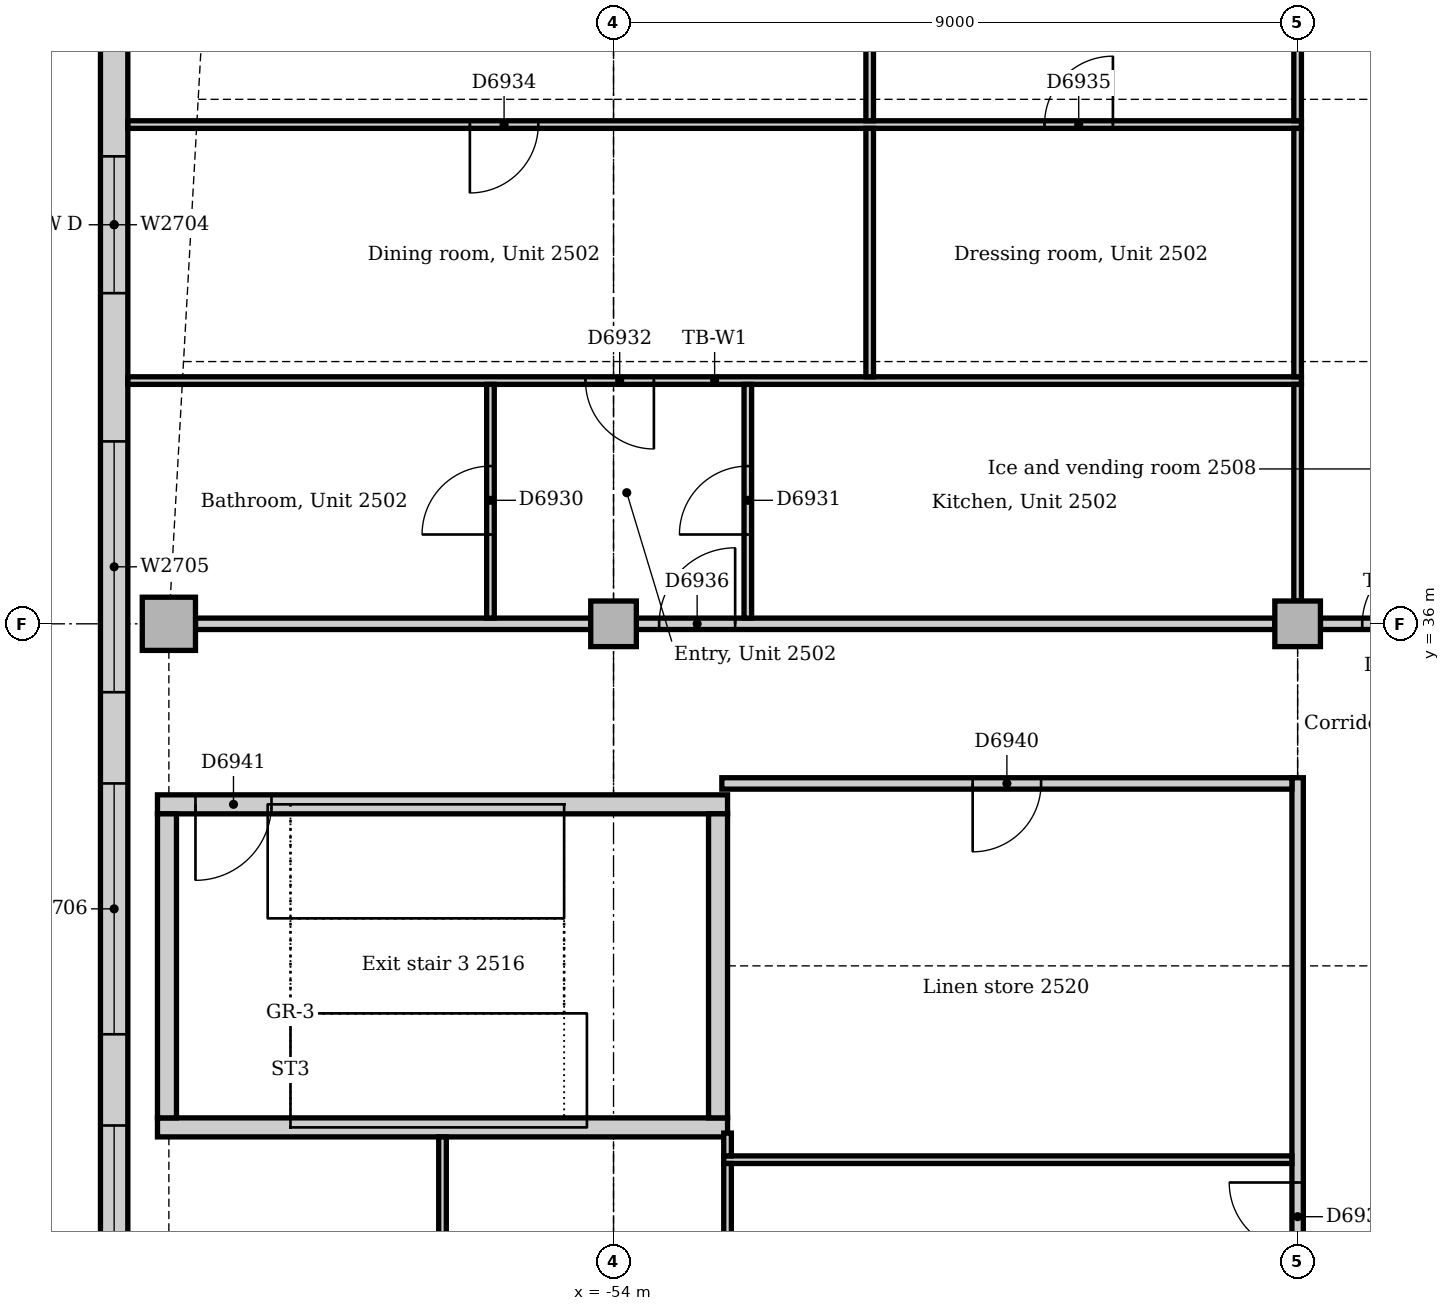
"""IFC4 building model, lengths in metres.
Left out: names, types, materials, properties, quantities, classifications, styles, units other than length and angle.
Written with IfcOpenShell. Run it as: python <this file> out.ifc"""

import sys

from ifc_helpers import new_model, si_unit, direction, frame, frame_2d, origin, origin_2d, place, context, subcontext, project, spatial, rectangle, extrude, element, fill, save


model = new_model("IFC4")
c1 = context("Model", 3, precision=1e-05, world=origin(), true_north=direction((0.0, 1.0)))
c2 = subcontext(c1, "Body", "Model", "MODEL_VIEW")
j1 = project(units=[si_unit("LENGTHUNIT", "METRE"), si_unit("PLANEANGLEUNIT", "RADIAN")], contexts=[c1])
p1 = place(None, origin())
s1 = spatial("IfcSite", under=j1, at=p1, CompositionType="ELEMENT")
p2 = place(p1, origin())
s2 = spatial("IfcBuilding", under=s1, at=p2, CompositionType="ELEMENT")
p3 = place(p2, frame((0.0, 0.0, 108.0)))
s3 = spatial("IfcBuildingStorey", under=s2, at=p3, CompositionType="ELEMENT", Elevation=108.0)
p4 = place(p3, frame((-60.0, 29.375, 0.0), z_axis=(0.0, 0.0, 1.0), x_axis=(1.0, 0.0, 0.0)))
e1 = element("IfcWall", 1, at=p4, inside=s3, PredefinedType="SOLIDWALL", context=c2, shape_type="SweptSolid", body=[
    extrude(rectangle(XDim=7.5, YDim=0.25, at=frame_2d((3.75, 0.0))), origin(), (0.0, 0.0, 1.0), 4.0),
])
p5 = place(p3, frame((-52.5, 33.625, 0.0), z_axis=(0.0, 0.0, 1.0), x_axis=(-1.0, 0.0, 0.0)))
e2 = element("IfcWall", 2, at=p5, inside=s3, PredefinedType="SOLIDWALL", context=c2, shape_type="SweptSolid", body=[
    extrude(rectangle(XDim=7.5, YDim=0.25, at=frame_2d((3.75, 0.0))), origin(), (0.0, 0.0, 1.0), 4.0),
])
p6 = place(p5, frame((6.0, 0.0, 0.0)))
e3 = element("IfcOpeningElement", 3, at=p6, cuts=e2, PredefinedType="OPENING", context=c2, shape_type="SweptSolid", body=[
    extrude(rectangle(XDim=1.0, YDim=2.1, at=frame_2d((0.5, 1.05))), frame((0.0, 0.135, 0.0), z_axis=(0.0, -1.0, 0.0), x_axis=(1.0, 0.0, 0.0)), (0.0, 0.0, 1.0), 0.27),
])
for number, where, z_axis, x_axis in (
    (4, (-52.625, 29.5, 0.0), (0.0, 0.0, 1.0), (0.0, 1.0, 0.0)),
    (5, (-59.875, 33.5, 0.0), (0.0, 0.0, 1.0), (0.0, -1.0, 0.0)),
):
    element("IfcWall", number, at=place(p3, frame(where, z_axis=z_axis, x_axis=x_axis)), inside=s3, PredefinedType="SOLIDWALL", context=c2, shape_type="SweptSolid", body=[
        extrude(rectangle(XDim=4.0, YDim=0.25, at=frame_2d((2.0, 0.0))), origin(), (0.0, 0.0, 1.0), 4.0),
    ])
p7 = place(p3, frame((-59.85, 36.0, 0.0), z_axis=(0.0, 0.0, 1.0), x_axis=(1.0, 0.0, 0.0)))
e6 = element("IfcColumn", 6, at=p7, inside=s3, PredefinedType="COLUMN", context=c2, shape_type="SweptSolid", body=[
    extrude(rectangle(XDim=0.7, YDim=0.7, at=origin_2d()), origin(), (0.0, 0.0, 1.0), 3.85),
])
for number, where, z_axis, x_axis in (
    (7, (-54.0, 36.0, 0.0), (0.0, 0.0, 1.0), (1.0, 0.0, 0.0)),
    (8, (-45.0, 36.0, 0.0), (0.0, 0.0, 1.0), (1.0, 0.0, 0.0)),
):
    element("IfcColumn", number, at=place(p3, frame(where, z_axis=z_axis, x_axis=x_axis)), inside=s3, PredefinedType="COLUMN", context=c2, shape_type="SweptSolid", body=[
        extrude(rectangle(XDim=0.6, YDim=0.6, at=origin_2d()), origin(), (0.0, 0.0, 1.0), 3.85),
    ])
p8 = place(p3, frame((-60.57, 45.257, 0.0), z_axis=(0.0, 0.0, 1.0), x_axis=(0.0, -1.0, 0.0)))
e9 = element("IfcWall", 9, at=p8, inside=s3, PredefinedType="STANDARD", context=c2, shape_type="SweptSolid", body=[
    extrude(rectangle(XDim=21.515, YDim=0.36, at=frame_2d((10.757, 0.0))), origin(), (0.0, 0.0, 1.0), 3.85),
])
p9 = place(p8, frame((3.107, 0.0, 0.9)))
e10 = element("IfcOpeningElement", 10, at=p9, cuts=e9, PredefinedType="OPENING", context=c2, shape_type="SweptSolid", body=[
    extrude(rectangle(XDim=1.8, YDim=1.6, at=frame_2d((0.9, 0.8))), frame((0.0, 0.19, 0.0), z_axis=(0.0, -1.0, 0.0), x_axis=(1.0, 0.0, 0.0)), (0.0, 0.0, 1.0), 0.38),
])
p10 = place(p8, frame((6.857, 0.0, 0.9)))
e11 = element("IfcOpeningElement", 11, at=p10, cuts=e9, PredefinedType="OPENING", context=c2, shape_type="SweptSolid", body=[
    extrude(rectangle(XDim=3.3, YDim=1.6, at=frame_2d((1.65, 0.8))), frame((0.0, 0.19, 0.0), z_axis=(0.0, -1.0, 0.0), x_axis=(1.0, 0.0, 0.0)), (0.0, 0.0, 1.0), 0.38),
])
p11 = place(p8, frame((11.357, 0.0, 0.9)))
e12 = element("IfcOpeningElement", 12, at=p11, cuts=e9, PredefinedType="OPENING", context=c2, shape_type="SweptSolid", body=[
    extrude(rectangle(XDim=3.3, YDim=1.6, at=frame_2d((1.65, 0.8))), frame((0.0, 0.19, 0.0), z_axis=(0.0, -1.0, 0.0), x_axis=(1.0, 0.0, 0.0)), (0.0, 0.0, 1.0), 0.38),
])
p12 = place(p8, frame((15.857, 0.0, 0.9)))
e13 = element("IfcOpeningElement", 13, at=p12, cuts=e9, PredefinedType="OPENING", context=c2, shape_type="SweptSolid", body=[
    extrude(rectangle(XDim=3.3, YDim=1.6, at=frame_2d((1.65, 0.8))), frame((0.0, 0.19, 0.0), z_axis=(0.0, -1.0, 0.0), x_axis=(1.0, 0.0, 0.0)), (0.0, 0.0, 1.0), 0.38),
])
p13 = place(p3, frame((-44.7, 36.0, 0.0), z_axis=(0.0, 0.0, 1.0), x_axis=(1.0, 0.0, 0.0)))
e14 = element("IfcWall", 14, at=p13, inside=s3, PredefinedType="PARTITIONING", context=c2, shape_type="SweptSolid", body=[
    extrude(rectangle(XDim=1.975, YDim=0.15, at=frame_2d((0.988, 0.0))), origin(), (0.0, 0.0, 1.0), 3.602),
])
p14 = place(p13, frame((0.55, 0.0, 0.0)))
e15 = element("IfcOpeningElement", 15, at=p14, cuts=e14, PredefinedType="OPENING", context=c2, shape_type="SweptSolid", body=[
    extrude(rectangle(XDim=0.9, YDim=2.1, at=frame_2d((0.45, 1.05))), frame((0.0, 0.085, 0.0), z_axis=(0.0, -1.0, 0.0), x_axis=(1.0, 0.0, 0.0)), (0.0, 0.0, 1.0), 0.17),
])
p15 = place(p3, frame((-53.7, 36.0, 0.0), z_axis=(0.0, 0.0, 1.0), x_axis=(1.0, 0.0, 0.0)))
e16 = element("IfcWall", 16, at=p15, inside=s3, PredefinedType="PARTITIONING", context=c2, shape_type="SweptSolid", body=[
    extrude(rectangle(XDim=8.4, YDim=0.15, at=frame_2d((4.2, 0.0))), origin(), (0.0, 0.0, 1.0), 3.262),
])
p16 = place(p15, frame((0.3, 0.0, 0.0)))
e17 = element("IfcOpeningElement", 17, at=p16, cuts=e16, PredefinedType="OPENING", context=c2, shape_type="SweptSolid", body=[
    extrude(rectangle(XDim=1.0, YDim=2.1, at=frame_2d((0.5, 1.05))), frame((0.0, 0.085, 0.0), z_axis=(0.0, -1.0, 0.0), x_axis=(1.0, 0.0, 0.0)), (0.0, 0.0, 1.0), 0.17),
])
p17 = place(p3, frame((-59.5, 36.0, 0.0), z_axis=(0.0, 0.0, 1.0), x_axis=(1.0, 0.0, 0.0)))
e18 = element("IfcWall", 18, at=p17, inside=s3, PredefinedType="PARTITIONING", context=c2, shape_type="SweptSolid", body=[
    extrude(rectangle(XDim=5.2, YDim=0.15, at=frame_2d((2.6, 0.0))), origin(), (0.0, 0.0, 1.0), 3.35),
])
p18 = place(p3, frame((-45.0, 27.3, 0.0), z_axis=(0.0, 0.0, 1.0), x_axis=(0.0, 1.0, 0.0)))
e19 = element("IfcWall", 19, at=p18, inside=s3, PredefinedType="PARTITIONING", context=c2, shape_type="SweptSolid", body=[
    extrude(rectangle(XDim=6.675, YDim=0.15, at=frame_2d((3.337, 0.0))), origin(), (0.0, 0.0, 1.0), 3.362),
])
p19 = place(p18, frame((0.45, 0.0, 0.0)))
e20 = element("IfcOpeningElement", 20, at=p19, cuts=e19, PredefinedType="OPENING", context=c2, shape_type="SweptSolid", body=[
    extrude(rectangle(XDim=0.9, YDim=2.1, at=frame_2d((0.45, 1.05))), frame((0.0, 0.085, 0.0), z_axis=(0.0, -1.0, 0.0), x_axis=(1.0, 0.0, 0.0)), (0.0, 0.0, 1.0), 0.17),
])
p20 = place(p3, frame((-52.575, 33.9, 0.0), z_axis=(0.0, 0.0, 1.0), x_axis=(1.0, 0.0, 0.0)))
e21 = element("IfcWall", 21, at=p20, inside=s3, PredefinedType="PARTITIONING", context=c2, shape_type="SweptSolid", body=[
    extrude(rectangle(XDim=7.5, YDim=0.15, at=frame_2d((3.75, 0.0))), origin(), (0.0, 0.0, 1.0), 3.85),
])
p21 = place(p20, frame((3.3, 0.0, 0.0)))
e22 = element("IfcOpeningElement", 22, at=p21, cuts=e21, PredefinedType="OPENING", context=c2, shape_type="SweptSolid", body=[
    extrude(rectangle(XDim=0.9, YDim=2.1, at=frame_2d((0.45, 1.05))), frame((0.0, 0.085, 0.0), z_axis=(0.0, -1.0, 0.0), x_axis=(1.0, 0.0, 0.0)), (0.0, 0.0, 1.0), 0.17),
])
p22 = place(p3, frame((-60.39, 39.2, 0.0), z_axis=(0.0, 0.0, 1.0), x_axis=(1.0, 0.0, 0.0)))
e23 = element("IfcWall", 23, at=p22, inside=s3, PredefinedType="PARTITIONING", context=c2, shape_type="SweptSolid", body=[
    extrude(rectangle(XDim=15.44, YDim=0.1, at=frame_2d((7.72, 0.0))), origin(), (0.0, 0.0, 1.0), 3.85),
])
p23 = place(p22, frame((6.021, 0.0, 0.0)))
e24 = element("IfcOpeningElement", 24, at=p23, cuts=e23, PredefinedType="OPENING", context=c2, shape_type="SweptSolid", body=[
    extrude(rectangle(XDim=0.9, YDim=2.1, at=frame_2d((0.45, 1.05))), frame((0.0, 0.06, 0.0), z_axis=(0.0, -1.0, 0.0), x_axis=(1.0, 0.0, 0.0)), (0.0, 0.0, 1.0), 0.12),
])
p24 = place(p3, frame((-60.39, 42.568, 0.0), z_axis=(0.0, 0.0, 1.0), x_axis=(1.0, 0.0, 0.0)))
e25 = element("IfcWall", 25, at=p24, inside=s3, PredefinedType="PARTITIONING", context=c2, shape_type="SweptSolid", body=[
    extrude(rectangle(XDim=15.44, YDim=0.1, at=frame_2d((7.72, 0.0))), origin(), (0.0, 0.0, 1.0), 3.85),
])
p25 = place(p24, frame((4.5, 0.0, 0.0)))
e26 = element("IfcOpeningElement", 26, at=p25, cuts=e25, PredefinedType="OPENING", context=c2, shape_type="SweptSolid", body=[
    extrude(rectangle(XDim=0.9, YDim=2.1, at=frame_2d((0.45, 1.05))), frame((0.0, 0.06, 0.0), z_axis=(0.0, -1.0, 0.0), x_axis=(1.0, 0.0, 0.0)), (0.0, 0.0, 1.0), 0.12),
])
p26 = place(p24, frame((12.06, 0.0, 0.0)))
e27 = element("IfcOpeningElement", 27, at=p26, cuts=e25, PredefinedType="OPENING", context=c2, shape_type="SweptSolid", body=[
    extrude(rectangle(XDim=0.9, YDim=2.1, at=frame_2d((0.45, 1.05))), frame((0.0, 0.06, 0.0), z_axis=(0.0, -1.0, 0.0), x_axis=(1.0, 0.0, 0.0)), (0.0, 0.0, 1.0), 0.12),
])
p27 = place(p3, frame((-45.0, 42.618, 0.0), z_axis=(0.0, 0.0, 1.0), x_axis=(0.0, 1.0, 0.0)))
e28 = element("IfcWall", 28, at=p27, inside=s3, PredefinedType="PARTITIONING", context=c2, shape_type="SweptSolid", body=[
    extrude(rectangle(XDim=3.432, YDim=0.1, at=frame_2d((1.716, 0.0))), origin(), (0.0, 0.0, 1.0), 3.362),
])
p28 = place(p3, frame((-45.0, 39.25, 0.0), z_axis=(0.0, 0.0, 1.0), x_axis=(0.0, 1.0, 0.0)))
e29 = element("IfcWall", 29, at=p28, inside=s3, PredefinedType="PARTITIONING", context=c2, shape_type="SweptSolid", body=[
    extrude(rectangle(XDim=3.268, YDim=0.1, at=frame_2d((1.634, 0.0))), origin(), (0.0, 0.0, 1.0), 3.362),
])
p29 = place(p3, frame((-45.0, 36.3, 0.0), z_axis=(0.0, 0.0, 1.0), x_axis=(0.0, 1.0, 0.0)))
e30 = element("IfcWall", 30, at=p29, inside=s3, PredefinedType="PARTITIONING", context=c2, shape_type="SweptSolid", body=[
    extrude(rectangle(XDim=2.85, YDim=0.1, at=frame_2d((1.425, 0.0))), origin(), (0.0, 0.0, 1.0), 3.362),
])
p30 = place(p3, frame((-50.63, 39.25, 0.0), z_axis=(0.0, 0.0, 1.0), x_axis=(0.0, 1.0, 0.0)))
e31 = element("IfcWall", 31, at=p30, inside=s3, PredefinedType="PARTITIONING", context=c2, shape_type="SweptSolid", body=[
    extrude(rectangle(XDim=3.268, YDim=0.1, at=frame_2d((1.634, 0.0))), origin(), (0.0, 0.0, 1.0), 3.85),
])
p31 = place(p3, frame((-50.63, 42.618, 0.0), z_axis=(0.0, 0.0, 1.0), x_axis=(0.0, 1.0, 0.0)))
e32 = element("IfcWall", 32, at=p31, inside=s3, PredefinedType="PARTITIONING", context=c2, shape_type="SweptSolid", body=[
    extrude(rectangle(XDim=6.522, YDim=0.1, at=frame_2d((3.261, 0.0))), origin(), (0.0, 0.0, 1.0), 3.85),
])
p32 = place(p31, frame((2.8, 0.0, 0.0)))
e33 = element("IfcOpeningElement", 33, at=p32, cuts=e32, PredefinedType="OPENING", context=c2, shape_type="SweptSolid", body=[
    extrude(rectangle(XDim=0.9, YDim=2.1, at=frame_2d((0.45, 1.05))), frame((0.0, 0.06, 0.0), z_axis=(0.0, -1.0, 0.0), x_axis=(1.0, 0.0, 0.0)), (0.0, 0.0, 1.0), 0.12),
])
p33 = place(p3, frame((-52.55, 28.95, 0.0), z_axis=(0.0, 0.0, 1.0), x_axis=(1.0, 0.0, 0.0)))
e34 = element("IfcWall", 34, at=p33, inside=s3, PredefinedType="PARTITIONING", context=c2, shape_type="SweptSolid", body=[
    extrude(rectangle(XDim=7.475, YDim=0.1, at=frame_2d((3.737, 0.0))), origin(), (0.0, 0.0, 1.0), 3.85),
])
p34 = place(p3, frame((-56.25, 24.075, 0.0), z_axis=(0.0, 0.0, 1.0), x_axis=(0.0, 1.0, 0.0)))
e35 = element("IfcWall", 35, at=p34, inside=s3, PredefinedType="PARTITIONING", context=c2, shape_type="SweptSolid", body=[
    extrude(rectangle(XDim=5.175, YDim=0.1, at=frame_2d((2.587, 0.0))), origin(), (0.0, 0.0, 1.0), 3.85),
])
p35 = place(p3, frame((-52.5, 29.0, 0.0), z_axis=(0.0, 0.0, 1.0), x_axis=(0.0, 1.0, 0.0)))
e36 = element("IfcWall", 36, at=p35, inside=s3, PredefinedType="PARTITIONING", context=c2, shape_type="SweptSolid", body=[
    extrude(rectangle(XDim=0.3, YDim=0.1, at=frame_2d((0.15, 0.0))), origin(), (0.0, 0.0, 1.0), 3.85),
])
p36 = place(p3, frame((-52.5, 24.075, 0.0), z_axis=(0.0, 0.0, 1.0), x_axis=(0.0, 1.0, 0.0)))
e37 = element("IfcWall", 37, at=p36, inside=s3, PredefinedType="PARTITIONING", context=c2, shape_type="SweptSolid", body=[
    extrude(rectangle(XDim=4.825, YDim=0.1, at=frame_2d((2.413, 0.0))), origin(), (0.0, 0.0, 1.0), 3.85),
])
p37 = place(p3, frame((-55.619, 36.075, 0.0), z_axis=(0.0, 0.0, 1.0), x_axis=(0.0, 1.0, 0.0)))
e38 = element("IfcWall", 38, at=p37, inside=s3, PredefinedType="PARTITIONING", context=c2, shape_type="SweptSolid", body=[
    extrude(rectangle(XDim=3.075, YDim=0.1, at=frame_2d((1.538, 0.0))), origin(), (0.0, 0.0, 1.0), 3.85),
])
p38 = place(p37, frame((1.1, 0.0, 0.0)))
e39 = element("IfcOpeningElement", 39, at=p38, cuts=e38, PredefinedType="OPENING", context=c2, shape_type="SweptSolid", body=[
    extrude(rectangle(XDim=0.9, YDim=2.1, at=frame_2d((0.45, 1.05))), frame((0.0, 0.06, 0.0), z_axis=(0.0, -1.0, 0.0), x_axis=(1.0, 0.0, 0.0)), (0.0, 0.0, 1.0), 0.12),
])
p39 = place(p3, frame((-52.233, 36.075, 0.0), z_axis=(0.0, 0.0, 1.0), x_axis=(0.0, 1.0, 0.0)))
e40 = element("IfcWall", 40, at=p39, inside=s3, PredefinedType="PARTITIONING", context=c2, shape_type="SweptSolid", body=[
    extrude(rectangle(XDim=3.075, YDim=0.1, at=frame_2d((1.538, 0.0))), origin(), (0.0, 0.0, 1.0), 3.85),
])
p40 = place(p39, frame((1.1, 0.0, 0.0)))
e41 = element("IfcOpeningElement", 41, at=p40, cuts=e40, PredefinedType="OPENING", context=c2, shape_type="SweptSolid", body=[
    extrude(rectangle(XDim=0.9, YDim=2.1, at=frame_2d((0.45, 1.05))), frame((0.0, 0.06, 0.0), z_axis=(0.0, -1.0, 0.0), x_axis=(1.0, 0.0, 0.0)), (0.0, 0.0, 1.0), 0.12),
])
p41 = place(p9, origin())
e42 = element("IfcWindow", 42, at=p41, inside=s3, PartitioningType="SINGLE_PANEL", PredefinedType="WINDOW", context=c2, shape_type="SweptSolid", body=[
    extrude(rectangle(XDim=1.8, YDim=1.6, at=frame_2d((0.9, 0.8))), frame((0.0, 0.13, 0.0), z_axis=(0.0, -1.0, 0.0), x_axis=(1.0, 0.0, 0.0)), (0.0, 0.0, 1.0), 0.06),
])
fill(e10, e42)
p42 = place(p10, origin())
e43 = element("IfcWindow", 43, at=p42, inside=s3, PartitioningType="SINGLE_PANEL", PredefinedType="WINDOW", context=c2, shape_type="SweptSolid", body=[
    extrude(rectangle(XDim=3.3, YDim=1.6, at=frame_2d((1.65, 0.8))), frame((0.0, 0.13, 0.0), z_axis=(0.0, -1.0, 0.0), x_axis=(1.0, 0.0, 0.0)), (0.0, 0.0, 1.0), 0.06),
])
fill(e11, e43)
p43 = place(p11, origin())
e44 = element("IfcWindow", 44, at=p43, inside=s3, PartitioningType="SINGLE_PANEL", PredefinedType="WINDOW", context=c2, shape_type="SweptSolid", body=[
    extrude(rectangle(XDim=3.3, YDim=1.6, at=frame_2d((1.65, 0.8))), frame((0.0, 0.13, 0.0), z_axis=(0.0, -1.0, 0.0), x_axis=(1.0, 0.0, 0.0)), (0.0, 0.0, 1.0), 0.06),
])
fill(e12, e44)
p44 = place(p12, origin())
e45 = element("IfcWindow", 45, at=p44, inside=s3, PartitioningType="SINGLE_PANEL", PredefinedType="WINDOW", context=c2, shape_type="SweptSolid", body=[
    extrude(rectangle(XDim=3.3, YDim=1.6, at=frame_2d((1.65, 0.8))), frame((0.0, 0.13, 0.0), z_axis=(0.0, -1.0, 0.0), x_axis=(1.0, 0.0, 0.0)), (0.0, 0.0, 1.0), 0.06),
])
fill(e13, e45)
p45 = place(p14, origin())
e46 = element("IfcDoor", 46, at=p45, inside=s3, OperationType="SINGLE_SWING_RIGHT", PredefinedType="DOOR", context=c2, shape_type="SweptSolid", body=[
    extrude(rectangle(XDim=0.9, YDim=2.1, at=frame_2d((0.45, 1.05))), frame((0.0, 0.025, 0.0), z_axis=(0.0, -1.0, 0.0), x_axis=(1.0, 0.0, 0.0)), (0.0, 0.0, 1.0), 0.05),
])
fill(e15, e46)
p46 = place(p38, origin())
e47 = element("IfcDoor", 47, at=p46, inside=s3, OperationType="SINGLE_SWING_LEFT", PredefinedType="DOOR", context=c2, shape_type="SweptSolid", body=[
    extrude(rectangle(XDim=0.9, YDim=2.1, at=frame_2d((0.45, 1.05))), frame((0.0, 0.025, 0.0), z_axis=(0.0, -1.0, 0.0), x_axis=(1.0, 0.0, 0.0)), (0.0, 0.0, 1.0), 0.05),
])
fill(e39, e47)
p47 = place(p40, origin())
e48 = element("IfcDoor", 48, at=p47, inside=s3, OperationType="SINGLE_SWING_LEFT", PredefinedType="DOOR", context=c2, shape_type="SweptSolid", body=[
    extrude(rectangle(XDim=0.9, YDim=2.1, at=frame_2d((0.45, 1.05))), frame((0.0, 0.025, 0.0), z_axis=(0.0, -1.0, 0.0), x_axis=(1.0, 0.0, 0.0)), (0.0, 0.0, 1.0), 0.05),
])
fill(e41, e48)
p48 = place(p23, frame((0.9, 0.0, 0.0), z_axis=(0.0, 0.0, 1.0), x_axis=(-1.0, 0.0, 0.0)))
e49 = element("IfcDoor", 49, at=p48, inside=s3, OperationType="SINGLE_SWING_LEFT", PredefinedType="DOOR", context=c2, shape_type="SweptSolid", body=[
    extrude(rectangle(XDim=0.9, YDim=2.1, at=frame_2d((0.45, 1.05))), frame((0.0, 0.025, 0.0), z_axis=(0.0, -1.0, 0.0), x_axis=(1.0, 0.0, 0.0)), (0.0, 0.0, 1.0), 0.05),
])
fill(e24, e49)
p49 = place(p25, frame((0.9, 0.0, 0.0), z_axis=(0.0, 0.0, 1.0), x_axis=(-1.0, 0.0, 0.0)))
e50 = element("IfcDoor", 50, at=p49, inside=s3, OperationType="SINGLE_SWING_RIGHT", PredefinedType="DOOR", context=c2, shape_type="SweptSolid", body=[
    extrude(rectangle(XDim=0.9, YDim=2.1, at=frame_2d((0.45, 1.05))), frame((0.0, 0.025, 0.0), z_axis=(0.0, -1.0, 0.0), x_axis=(1.0, 0.0, 0.0)), (0.0, 0.0, 1.0), 0.05),
])
fill(e26, e50)
p50 = place(p26, origin())
e51 = element("IfcDoor", 51, at=p50, inside=s3, OperationType="SINGLE_SWING_RIGHT", PredefinedType="DOOR", context=c2, shape_type="SweptSolid", body=[
    extrude(rectangle(XDim=0.9, YDim=2.1, at=frame_2d((0.45, 1.05))), frame((0.0, 0.025, 0.0), z_axis=(0.0, -1.0, 0.0), x_axis=(1.0, 0.0, 0.0)), (0.0, 0.0, 1.0), 0.05),
])
fill(e27, e51)
p51 = place(p16, origin())
e52 = element("IfcDoor", 52, at=p51, inside=s3, OperationType="SINGLE_SWING_RIGHT", PredefinedType="DOOR", context=c2, shape_type="SweptSolid", body=[
    extrude(rectangle(XDim=1.0, YDim=2.1, at=frame_2d((0.5, 1.05))), frame((0.0, 0.025, 0.0), z_axis=(0.0, -1.0, 0.0), x_axis=(1.0, 0.0, 0.0)), (0.0, 0.0, 1.0), 0.05),
])
fill(e17, e52)
p52 = place(p19, origin())
e53 = element("IfcDoor", 53, at=p52, inside=s3, OperationType="SINGLE_SWING_RIGHT", PredefinedType="DOOR", context=c2, shape_type="SweptSolid", body=[
    extrude(rectangle(XDim=0.9, YDim=2.1, at=frame_2d((0.45, 1.05))), frame((0.0, 0.025, 0.0), z_axis=(0.0, -1.0, 0.0), x_axis=(1.0, 0.0, 0.0)), (0.0, 0.0, 1.0), 0.05),
])
fill(e20, e53)
p53 = place(p21, frame((0.9, 0.0, 0.0), z_axis=(0.0, 0.0, 1.0), x_axis=(-1.0, 0.0, 0.0)))
e54 = element("IfcDoor", 54, at=p53, inside=s3, OperationType="SINGLE_SWING_RIGHT", PredefinedType="DOOR", context=c2, shape_type="SweptSolid", body=[
    extrude(rectangle(XDim=0.9, YDim=2.1, at=frame_2d((0.45, 1.05))), frame((0.0, 0.025, 0.0), z_axis=(0.0, -1.0, 0.0), x_axis=(1.0, 0.0, 0.0)), (0.0, 0.0, 1.0), 0.05),
])
fill(e22, e54)
p54 = place(p6, origin())
e55 = element("IfcDoor", 55, at=p54, inside=s3, OperationType="SINGLE_SWING_RIGHT", PredefinedType="DOOR", context=c2, shape_type="SweptSolid", body=[
    extrude(rectangle(XDim=1.0, YDim=2.1, at=frame_2d((0.5, 1.05))), frame((0.0, 0.025, 0.0), z_axis=(0.0, -1.0, 0.0), x_axis=(1.0, 0.0, 0.0)), (0.0, 0.0, 1.0), 0.05),
])
fill(e3, e55)
save(model, sys.argv[1])
